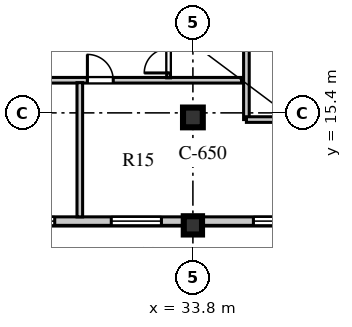
"""IFC4 building model, lengths in metres.
Left out: names, types, materials, properties, quantities, classifications, styles, units other than length and angle.
Written with IfcOpenShell. Run it as: python <this file> out.ifc"""

import sys

from ifc_helpers import new_model, si_unit, direction, frame, frame_2d, origin, origin_2d, place, context, subcontext, project, spatial, rectangle, extrude, element, fill, save


model = new_model("IFC4")
c1 = context("Model", 3, precision=1e-05, world=origin(), true_north=direction((0.0, 1.0)))
c2 = subcontext(c1, "Body", "Model", "MODEL_VIEW")
j1 = project(units=[si_unit("LENGTHUNIT", "METRE"), si_unit("PLANEANGLEUNIT", "RADIAN")], contexts=[c1])
p1 = place(None, origin())
s1 = spatial("IfcSite", under=j1, at=p1, CompositionType="ELEMENT")
p2 = place(p1, origin())
s2 = spatial("IfcBuilding", under=s1, at=p2, CompositionType="ELEMENT")
p3 = place(p2, frame((0.0, 0.0, 342.9)))
s3 = spatial("IfcBuildingStorey", under=s2, at=p3, CompositionType="ELEMENT", Elevation=342.9)
p4 = place(p3, frame((33.8, 15.25, 0.0), z_axis=(0.0, 0.0, 1.0), x_axis=(1.0, 0.0, 0.0)))
e1 = element("IfcColumn", 1, at=p4, inside=s3, PredefinedType="COLUMN", context=c2, shape_type="SweptSolid", body=[
    extrude(rectangle(XDim=0.65, YDim=0.65, at=origin_2d()), origin(), (0.0, 0.0, 1.0), 3.55),
])
p5 = place(p3, frame((33.8, 11.7, 0.0), z_axis=(0.0, 0.0, 1.0), x_axis=(1.0, 0.0, 0.0)))
e2 = element("IfcColumn", 2, at=p5, inside=s3, PredefinedType="COLUMN", context=c2, shape_type="SweptSolid", body=[
    extrude(rectangle(XDim=0.6, YDim=0.6, at=origin_2d()), origin(), (0.0, 0.0, 1.0), 3.55),
])
p6 = place(p3, frame((14.4, 11.84, 0.0), z_axis=(0.0, 0.0, 1.0), x_axis=(1.0, 0.0, 0.0)))
e3 = element("IfcWall", 3, at=p6, inside=s3, PredefinedType="STANDARD", context=c2, shape_type="SweptSolid", body=[
    extrude(rectangle(XDim=25.2, YDim=0.28, at=frame_2d((12.6, 0.0))), origin(), (0.0, 0.0, 1.0), 2.91),
])
p7 = place(p6, frame((4.75, 0.0, 0.8)))
e4 = element("IfcOpeningElement", 4, at=p7, cuts=e3, PredefinedType="OPENING", context=c2, shape_type="SweptSolid", body=[
    extrude(rectangle(XDim=2.1, YDim=1.95, at=frame_2d((1.05, 0.975))), frame((0.0, 0.15, 0.0), z_axis=(0.0, -1.0, 0.0), x_axis=(1.0, 0.0, 0.0)), (0.0, 0.0, 1.0), 0.3),
])
p8 = place(p6, frame((13.505, 0.0, 0.8)))
e5 = element("IfcOpeningElement", 5, at=p8, cuts=e3, PredefinedType="OPENING", context=c2, shape_type="SweptSolid", body=[
    extrude(rectangle(XDim=1.35, YDim=1.9, at=frame_2d((0.675, 0.95))), frame((0.0, 0.15, 0.0), z_axis=(0.0, -1.0, 0.0), x_axis=(1.0, 0.0, 0.0)), (0.0, 0.0, 1.0), 0.3),
])
p9 = place(p6, frame((16.715, 0.0, 0.8)))
e6 = element("IfcOpeningElement", 6, at=p9, cuts=e3, PredefinedType="OPENING", context=c2, shape_type="SweptSolid", body=[
    extrude(rectangle(XDim=1.65, YDim=1.95, at=frame_2d((0.825, 0.975))), frame((0.0, 0.15, 0.0), z_axis=(0.0, -1.0, 0.0), x_axis=(1.0, 0.0, 0.0)), (0.0, 0.0, 1.0), 0.3),
])
p10 = place(p6, frame((21.39, 0.0, 0.8)))
e7 = element("IfcOpeningElement", 7, at=p10, cuts=e3, PredefinedType="OPENING", context=c2, shape_type="SweptSolid", body=[
    extrude(rectangle(XDim=1.95, YDim=2.0, at=frame_2d((0.975, 1.0))), frame((0.0, 0.15, 0.0), z_axis=(0.0, -1.0, 0.0), x_axis=(1.0, 0.0, 0.0)), (0.0, 0.0, 1.0), 0.3),
])
p11 = place(p3, frame((27.24, 16.473, 0.0), z_axis=(0.0, 0.0, 1.0), x_axis=(1.0, 0.0, 0.0)))
e8 = element("IfcWall", 8, at=p11, inside=s3, PredefinedType="SOLIDWALL", context=c2, shape_type="SweptSolid", body=[
    extrude(rectangle(XDim=8.16, YDim=0.185, at=frame_2d((4.08, 0.0))), origin(), (0.0, 0.0, 1.0), 3.55),
])
p12 = place(p11, frame((0.3, 0.0, 0.0)))
e9 = element("IfcOpeningElement", 9, at=p12, cuts=e8, PredefinedType="OPENING", context=c2, shape_type="SweptSolid", body=[
    extrude(rectangle(XDim=0.85, YDim=2.08, at=frame_2d((0.425, 1.04))), frame((0.0, 0.103, 0.0), z_axis=(0.0, -1.0, 0.0), x_axis=(1.0, 0.0, 0.0)), (0.0, 0.0, 1.0), 0.205),
])
p13 = place(p11, frame((3.09, 0.0, 0.0)))
e10 = element("IfcOpeningElement", 10, at=p13, cuts=e8, PredefinedType="OPENING", context=c2, shape_type="SweptSolid", body=[
    extrude(rectangle(XDim=0.85, YDim=2.08, at=frame_2d((0.425, 1.04))), frame((0.0, 0.103, 0.0), z_axis=(0.0, -1.0, 0.0), x_axis=(1.0, 0.0, 0.0)), (0.0, 0.0, 1.0), 0.205),
])
p14 = place(p3, frame((33.0, 16.553, 0.0), z_axis=(0.0, 0.0, 1.0), x_axis=(0.0, 1.0, 0.0)))
e11 = element("IfcWall", 11, at=p14, inside=s3, PredefinedType="PLUMBINGWALL", context=c2, shape_type="SweptSolid", body=[
    extrude(rectangle(XDim=4.787, YDim=0.125, at=frame_2d((2.394, 0.0))), origin(), (0.0, 0.0, 1.0), 3.55),
])
p15 = place(p14, frame((0.16, 0.0, 0.0)))
e12 = element("IfcOpeningElement", 12, at=p15, cuts=e11, PredefinedType="OPENING", context=c2, shape_type="SweptSolid", body=[
    extrude(rectangle(XDim=0.8, YDim=2.05, at=frame_2d((0.4, 1.025))), frame((0.0, 0.073, 0.0), z_axis=(0.0, -1.0, 0.0), x_axis=(1.0, 0.0, 0.0)), (0.0, 0.0, 1.0), 0.145),
])
p16 = place(p14, frame((2.578, 0.0, 0.0)))
e13 = element("IfcOpeningElement", 13, at=p16, cuts=e11, PredefinedType="OPENING", context=c2, shape_type="SweptSolid", body=[
    extrude(rectangle(XDim=0.85, YDim=2.08, at=frame_2d((0.425, 1.04))), frame((0.0, 0.073, 0.0), z_axis=(0.0, -1.0, 0.0), x_axis=(1.0, 0.0, 0.0)), (0.0, 0.0, 1.0), 0.145),
])
p17 = place(p3, frame((30.08, 11.98, 0.0), z_axis=(0.0, 0.0, 1.0), x_axis=(0.0, 1.0, 0.0)))
e14 = element("IfcWall", 14, at=p17, inside=s3, PredefinedType="SOLIDWALL", context=c2, shape_type="SweptSolid", body=[
    extrude(rectangle(XDim=4.413, YDim=0.185, at=frame_2d((2.207, 0.0))), origin(), (0.0, 0.0, 1.0), 3.55),
])
p18 = place(p3, frame((35.56, 15.18, 0.0), z_axis=(0.0, 0.0, 1.0), x_axis=(0.0, 1.0, 0.0)))
e15 = element("IfcWall", 15, at=p18, inside=s3, PredefinedType="SOLIDWALL", context=c2, shape_type="SweptSolid", body=[
    extrude(rectangle(XDim=12.07, YDim=0.185, at=frame_2d((6.035, 0.0))), origin(), (0.0, 0.0, 1.0), 3.55),
])
p19 = place(p18, frame((6.87, 0.0, 0.0)))
e16 = element("IfcOpeningElement", 16, at=p19, cuts=e15, PredefinedType="OPENING", context=c2, shape_type="SweptSolid", body=[
    extrude(rectangle(XDim=0.95, YDim=2.1, at=frame_2d((0.475, 1.05))), frame((0.0, 0.103, 0.0), z_axis=(0.0, -1.0, 0.0), x_axis=(1.0, 0.0, 0.0)), (0.0, 0.0, 1.0), 0.205),
])
p20 = place(p3, frame((35.56, 15.18, 0.0), z_axis=(0.0, 0.0, 1.0), x_axis=(1.0, 0.0, 0.0)))
e17 = element("IfcWall", 17, at=p20, inside=s3, PredefinedType="SOLIDWALL", context=c2, shape_type="SweptSolid", body=[
    extrude(rectangle(XDim=6.96, YDim=0.185, at=frame_2d((3.48, 0.0))), origin(), (0.0, 0.0, 1.0), 3.1),
])
p21 = place(p8, origin())
e18 = element("IfcWindow", 18, at=p21, inside=s3, PartitioningType="SINGLE_PANEL", PredefinedType="WINDOW", context=c2, shape_type="SweptSolid", body=[
    extrude(rectangle(XDim=1.35, YDim=1.9, at=frame_2d((0.675, 0.95))), frame((0.0, 0.03, 0.0), z_axis=(0.0, -1.0, 0.0), x_axis=(1.0, 0.0, 0.0)), (0.0, 0.0, 1.0), 0.06),
])
fill(e5, e18)
p22 = place(p9, origin())
e19 = element("IfcWindow", 19, at=p22, inside=s3, PartitioningType="SINGLE_PANEL", PredefinedType="WINDOW", context=c2, shape_type="SweptSolid", body=[
    extrude(rectangle(XDim=1.65, YDim=1.95, at=frame_2d((0.825, 0.975))), frame((0.0, 0.03, 0.0), z_axis=(0.0, -1.0, 0.0), x_axis=(1.0, 0.0, 0.0)), (0.0, 0.0, 1.0), 0.06),
])
fill(e6, e19)
p23 = place(p10, origin())
e20 = element("IfcWindow", 20, at=p23, inside=s3, PartitioningType="SINGLE_PANEL", PredefinedType="WINDOW", context=c2, shape_type="SweptSolid", body=[
    extrude(rectangle(XDim=1.95, YDim=2.0, at=frame_2d((0.975, 1.0))), frame((0.0, 0.03, 0.0), z_axis=(0.0, -1.0, 0.0), x_axis=(1.0, 0.0, 0.0)), (0.0, 0.0, 1.0), 0.06),
])
fill(e7, e20)
p24 = place(p15, origin())
e21 = element("IfcDoor", 21, at=p24, inside=s3, OperationType="SINGLE_SWING_LEFT", PredefinedType="DOOR", context=c2, shape_type="SweptSolid", body=[
    extrude(rectangle(XDim=0.8, YDim=2.05, at=frame_2d((0.4, 1.025))), frame((0.0, 0.025, 0.0), z_axis=(0.0, -1.0, 0.0), x_axis=(1.0, 0.0, 0.0)), (0.0, 0.0, 1.0), 0.05),
])
fill(e12, e21)
p25 = place(p13, frame((0.85, 0.0, 0.0), z_axis=(0.0, 0.0, 1.0), x_axis=(-1.0, 0.0, 0.0)))
e22 = element("IfcDoor", 22, at=p25, inside=s3, OperationType="SINGLE_SWING_RIGHT", PredefinedType="DOOR", context=c2, shape_type="SweptSolid", body=[
    extrude(rectangle(XDim=0.85, YDim=2.08, at=frame_2d((0.425, 1.04))), frame((0.0, 0.025, 0.0), z_axis=(0.0, -1.0, 0.0), x_axis=(1.0, 0.0, 0.0)), (0.0, 0.0, 1.0), 0.05),
])
fill(e10, e22)
save(model, sys.argv[1])
